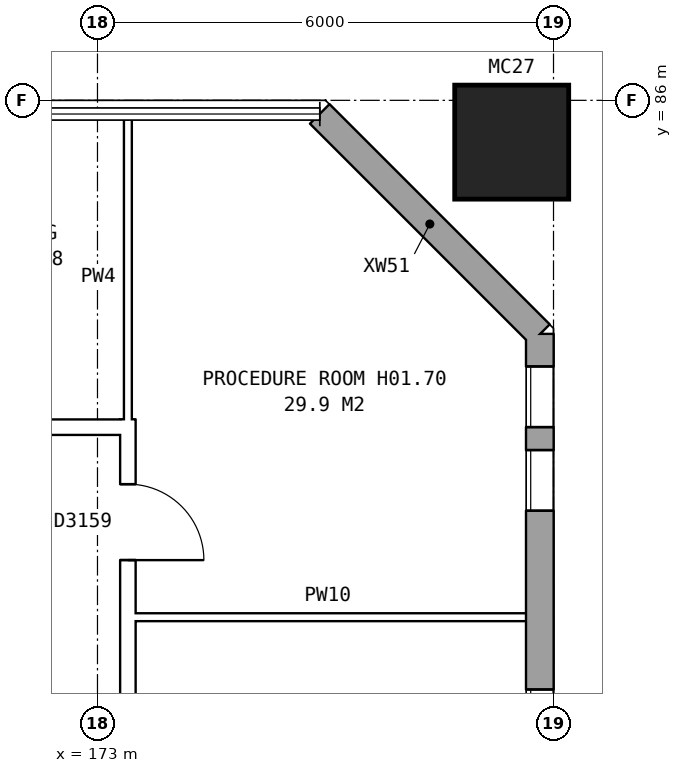
"""IFC4 building model, lengths in metres.
Left out: names, types, materials, properties, quantities, classifications, styles, units other than length and angle.
Written with IfcOpenShell. Run it as: python <this file> out.ifc"""

import sys

from ifc_helpers import new_model, si_unit, direction, frame, frame_2d, origin, origin_2d, place, context, subcontext, project, spatial, rectangle, hollow_rectangle, extrude, element, fill, save


model = new_model("IFC4")
c1 = context("Model", 3, precision=1e-05, world=origin(), true_north=direction((0.0, 1.0)))
c2 = subcontext(c1, "Body", "Model", "MODEL_VIEW")
j1 = project(units=[si_unit("LENGTHUNIT", "METRE"), si_unit("PLANEANGLEUNIT", "RADIAN")], contexts=[c1])
p1 = place(None, origin())
s1 = spatial("IfcSite", under=j1, at=p1, CompositionType="ELEMENT")
p2 = place(p1, origin())
s2 = spatial("IfcBuilding", under=s1, at=p2, CompositionType="ELEMENT")
p3 = place(p2, frame((0.0, 0.0, 5.5)))
s3 = spatial("IfcBuildingStorey", under=s2, at=p3, CompositionType="ELEMENT", Elevation=5.5)
p4 = place(p3, frame((178.45, 85.45, 0.0), z_axis=(0.0, 0.0, 1.0), x_axis=(1.0, 0.0, 0.0)))
e1 = element("IfcColumn", 1, at=p4, inside=s3, PredefinedType="COLUMN", context=c2, shape_type="SweptSolid", body=[
    extrude(hollow_rectangle(XDim=1.5, YDim=1.5, WallThickness=0.08, at=origin_2d()), origin(), (0.0, 0.0, 1.0), 4.6),
])
p5 = place(p3, frame((178.82, 57.075, 0.0), z_axis=(0.0, 0.0, 1.0), x_axis=(0.0, 1.0, 0.0)))
e2 = element("IfcWall", 2, at=p5, inside=s3, PredefinedType="STANDARD", context=c2, shape_type="SweptSolid", body=[
    extrude(rectangle(XDim=25.851, YDim=0.36, at=frame_2d((12.925, 0.0))), origin(), (0.0, 0.0, 1.0), 4.3),
])
p6 = place(p5, frame((0.3, 0.0, 1.4)))
e3 = element("IfcOpeningElement", 3, at=p6, cuts=e2, PredefinedType="OPENING", context=c2, shape_type="SweptSolid", body=[
    extrude(rectangle(XDim=0.8, YDim=1.2, at=frame_2d((0.4, 0.6))), frame((0.0, 0.19, 0.0), z_axis=(0.0, -1.0, 0.0), x_axis=(1.0, 0.0, 0.0)), (0.0, 0.0, 1.0), 0.38),
])
p7 = place(p5, frame((4.575, 0.0, 0.8)))
e4 = element("IfcOpeningElement", 4, at=p7, cuts=e2, PredefinedType="OPENING", context=c2, shape_type="SweptSolid", body=[
    extrude(rectangle(XDim=0.8, YDim=0.9, at=frame_2d((0.4, 0.45))), frame((0.0, 0.19, 0.0), z_axis=(0.0, -1.0, 0.0), x_axis=(1.0, 0.0, 0.0)), (0.0, 0.0, 1.0), 0.38),
])
p8 = place(p5, frame((7.625, 0.0, 0.8)))
e5 = element("IfcOpeningElement", 5, at=p8, cuts=e2, PredefinedType="OPENING", context=c2, shape_type="SweptSolid", body=[
    extrude(rectangle(XDim=1.6, YDim=1.8, at=frame_2d((0.8, 0.9))), frame((0.0, 0.19, 0.0), z_axis=(0.0, -1.0, 0.0), x_axis=(1.0, 0.0, 0.0)), (0.0, 0.0, 1.0), 0.38),
])
p9 = place(p5, frame((10.625, 0.0, 0.8)))
e6 = element("IfcOpeningElement", 6, at=p9, cuts=e2, PredefinedType="OPENING", context=c2, shape_type="SweptSolid", body=[
    extrude(rectangle(XDim=1.6, YDim=1.8, at=frame_2d((0.8, 0.9))), frame((0.0, 0.19, 0.0), z_axis=(0.0, -1.0, 0.0), x_axis=(1.0, 0.0, 0.0)), (0.0, 0.0, 1.0), 0.38),
])
p10 = place(p5, frame((13.625, 0.0, 0.8)))
e7 = element("IfcOpeningElement", 7, at=p10, cuts=e2, PredefinedType="OPENING", context=c2, shape_type="SweptSolid", body=[
    extrude(rectangle(XDim=1.6, YDim=1.8, at=frame_2d((0.8, 0.9))), frame((0.0, 0.19, 0.0), z_axis=(0.0, -1.0, 0.0), x_axis=(1.0, 0.0, 0.0)), (0.0, 0.0, 1.0), 0.38),
])
p11 = place(p5, frame((16.625, 0.0, 0.8)))
e8 = element("IfcOpeningElement", 8, at=p11, cuts=e2, PredefinedType="OPENING", context=c2, shape_type="SweptSolid", body=[
    extrude(rectangle(XDim=1.6, YDim=1.8, at=frame_2d((0.8, 0.9))), frame((0.0, 0.19, 0.0), z_axis=(0.0, -1.0, 0.0), x_axis=(1.0, 0.0, 0.0)), (0.0, 0.0, 1.0), 0.38),
])
p12 = place(p5, frame((19.075, 0.0, 0.8)))
e9 = element("IfcOpeningElement", 9, at=p12, cuts=e2, PredefinedType="OPENING", context=c2, shape_type="SweptSolid", body=[
    extrude(rectangle(XDim=1.0, YDim=1.2, at=frame_2d((0.5, 0.6))), frame((0.0, 0.19, 0.0), z_axis=(0.0, -1.0, 0.0), x_axis=(1.0, 0.0, 0.0)), (0.0, 0.0, 1.0), 0.38),
])
p13 = place(p5, frame((23.525, 0.0, 1.7)))
e10 = element("IfcOpeningElement", 10, at=p13, cuts=e2, PredefinedType="OPENING", context=c2, shape_type="SweptSolid", body=[
    extrude(rectangle(XDim=0.8, YDim=0.9, at=frame_2d((0.4, 0.45))), frame((0.0, 0.19, 0.0), z_axis=(0.0, -1.0, 0.0), x_axis=(1.0, 0.0, 0.0)), (0.0, 0.0, 1.0), 0.38),
])
p14 = place(p5, frame((1.4, 0.0, 1.7)))
e11 = element("IfcOpeningElement", 11, at=p14, cuts=e2, PredefinedType="OPENING", context=c2, shape_type="SweptSolid", body=[
    extrude(rectangle(XDim=0.8, YDim=0.9, at=frame_2d((0.4, 0.45))), frame((0.0, 0.19, 0.0), z_axis=(0.0, -1.0, 0.0), x_axis=(1.0, 0.0, 0.0)), (0.0, 0.0, 1.0), 0.38),
])
p15 = place(p5, frame((5.675, 0.0, 0.8)))
e12 = element("IfcOpeningElement", 12, at=p15, cuts=e2, PredefinedType="OPENING", context=c2, shape_type="SweptSolid", body=[
    extrude(rectangle(XDim=1.0, YDim=1.2, at=frame_2d((0.5, 0.6))), frame((0.0, 0.19, 0.0), z_axis=(0.0, -1.0, 0.0), x_axis=(1.0, 0.0, 0.0)), (0.0, 0.0, 1.0), 0.38),
])
p16 = place(p5, frame((20.375, 0.0, 0.8)))
e13 = element("IfcOpeningElement", 13, at=p16, cuts=e2, PredefinedType="OPENING", context=c2, shape_type="SweptSolid", body=[
    extrude(rectangle(XDim=0.8, YDim=0.9, at=frame_2d((0.4, 0.45))), frame((0.0, 0.19, 0.0), z_axis=(0.0, -1.0, 0.0), x_axis=(1.0, 0.0, 0.0)), (0.0, 0.0, 1.0), 0.38),
])
p17 = place(p5, frame((24.625, 0.0, 1.4)))
e14 = element("IfcOpeningElement", 14, at=p17, cuts=e2, PredefinedType="OPENING", context=c2, shape_type="SweptSolid", body=[
    extrude(rectangle(XDim=0.8, YDim=1.2, at=frame_2d((0.4, 0.6))), frame((0.0, 0.19, 0.0), z_axis=(0.0, -1.0, 0.0), x_axis=(1.0, 0.0, 0.0)), (0.0, 0.0, 1.0), 0.38),
])
p18 = place(p3, frame((178.82, 82.925, 0.0), z_axis=(0.0, 0.0, 1.0), x_axis=(-0.707106781187, 0.707106781187, 0.0)))
e15 = element("IfcWall", 15, at=p18, inside=s3, PredefinedType="STANDARD", context=c2, shape_type="SweptSolid", body=[
    extrude(rectangle(XDim=4.094, YDim=0.36, at=frame_2d((2.047, 0.0))), origin(), (0.0, 0.0, 1.0), 4.3),
])
p19 = place(p3, frame((173.3, 79.2, 0.0), z_axis=(0.0, 0.0, 1.0), x_axis=(1.0, 0.0, 0.0)))
e16 = element("IfcWall", 16, at=p19, inside=s3, PredefinedType="PARTITIONING", context=c2, shape_type="SweptSolid", body=[
    extrude(rectangle(XDim=5.46, YDim=0.1, at=frame_2d((2.73, 0.0))), origin(), (0.0, 0.0, 1.0), 4.3),
])
p20 = place(p3, frame((157.53, 81.7, 0.0), z_axis=(0.0, 0.0, 1.0), x_axis=(1.0, 0.0, 0.0)))
e17 = element("IfcWall", 17, at=p20, inside=s3, PredefinedType="PARTITIONING", context=c2, shape_type="SweptSolid", body=[
    extrude(rectangle(XDim=15.97, YDim=0.2, at=frame_2d((7.985, 0.0))), origin(), (0.0, 0.0, 1.0), 4.3),
])
p21 = place(p20, frame((2.795, 0.0, 0.0)))
e18 = element("IfcOpeningElement", 18, at=p21, cuts=e17, PredefinedType="OPENING", context=c2, shape_type="SweptSolid", body=[
    extrude(rectangle(XDim=1.0, YDim=2.1, at=frame_2d((0.5, 1.05))), frame((0.0, 0.11, 0.0), z_axis=(0.0, -1.0, 0.0), x_axis=(1.0, 0.0, 0.0)), (0.0, 0.0, 1.0), 0.22),
])
p22 = place(p20, frame((8.97, 0.0, 0.0)))
e19 = element("IfcOpeningElement", 19, at=p22, cuts=e17, PredefinedType="OPENING", context=c2, shape_type="SweptSolid", body=[
    extrude(rectangle(XDim=1.0, YDim=2.1, at=frame_2d((0.5, 1.05))), frame((0.0, 0.11, 0.0), z_axis=(0.0, -1.0, 0.0), x_axis=(1.0, 0.0, 0.0)), (0.0, 0.0, 1.0), 0.22),
])
p23 = place(p20, frame((13.67, 0.0, 0.0)))
e20 = element("IfcOpeningElement", 20, at=p23, cuts=e17, PredefinedType="OPENING", context=c2, shape_type="SweptSolid", body=[
    extrude(rectangle(XDim=1.0, YDim=2.1, at=frame_2d((0.5, 1.05))), frame((0.0, 0.11, 0.0), z_axis=(0.0, -1.0, 0.0), x_axis=(1.0, 0.0, 0.0)), (0.0, 0.0, 1.0), 0.22),
])
p24 = place(p3, frame((173.4, 58.198, 0.0), z_axis=(0.0, 0.0, 1.0), x_axis=(0.0, 1.0, 0.0)))
e21 = element("IfcWall", 21, at=p24, inside=s3, PredefinedType="PARTITIONING", context=c2, shape_type="SweptSolid", body=[
    extrude(rectangle(XDim=23.604, YDim=0.2, at=frame_2d((11.802, 0.0))), origin(), (0.0, 0.0, 1.0), 4.3),
])
p25 = place(p24, frame((0.851, 0.0, 0.0)))
e22 = element("IfcOpeningElement", 22, at=p25, cuts=e21, PredefinedType="OPENING", context=c2, shape_type="SweptSolid", body=[
    extrude(rectangle(XDim=1.0, YDim=2.1, at=frame_2d((0.5, 1.05))), frame((0.0, 0.11, 0.0), z_axis=(0.0, -1.0, 0.0), x_axis=(1.0, 0.0, 0.0)), (0.0, 0.0, 1.0), 0.22),
])
p26 = place(p24, frame((3.702, 0.0, 0.0)))
e23 = element("IfcOpeningElement", 23, at=p26, cuts=e21, PredefinedType="OPENING", context=c2, shape_type="SweptSolid", body=[
    extrude(rectangle(XDim=1.0, YDim=2.1, at=frame_2d((0.5, 1.05))), frame((0.0, 0.11, 0.0), z_axis=(0.0, -1.0, 0.0), x_axis=(1.0, 0.0, 0.0)), (0.0, 0.0, 1.0), 0.22),
])
p27 = place(p24, frame((6.802, 0.0, 0.0)))
e24 = element("IfcOpeningElement", 24, at=p27, cuts=e21, PredefinedType="OPENING", context=c2, shape_type="SweptSolid", body=[
    extrude(rectangle(XDim=1.0, YDim=2.1, at=frame_2d((0.5, 1.05))), frame((0.0, 0.11, 0.0), z_axis=(0.0, -1.0, 0.0), x_axis=(1.0, 0.0, 0.0)), (0.0, 0.0, 1.0), 0.22),
])
p28 = place(p24, frame((9.802, 0.0, 0.0)))
e25 = element("IfcOpeningElement", 25, at=p28, cuts=e21, PredefinedType="OPENING", context=c2, shape_type="SweptSolid", body=[
    extrude(rectangle(XDim=1.0, YDim=2.1, at=frame_2d((0.5, 1.05))), frame((0.0, 0.11, 0.0), z_axis=(0.0, -1.0, 0.0), x_axis=(1.0, 0.0, 0.0)), (0.0, 0.0, 1.0), 0.22),
])
p29 = place(p24, frame((12.802, 0.0, 0.0)))
e26 = element("IfcOpeningElement", 26, at=p29, cuts=e21, PredefinedType="OPENING", context=c2, shape_type="SweptSolid", body=[
    extrude(rectangle(XDim=1.0, YDim=2.1, at=frame_2d((0.5, 1.05))), frame((0.0, 0.11, 0.0), z_axis=(0.0, -1.0, 0.0), x_axis=(1.0, 0.0, 0.0)), (0.0, 0.0, 1.0), 0.22),
])
p30 = place(p24, frame((15.802, 0.0, 0.0)))
e27 = element("IfcOpeningElement", 27, at=p30, cuts=e21, PredefinedType="OPENING", context=c2, shape_type="SweptSolid", body=[
    extrude(rectangle(XDim=1.0, YDim=2.1, at=frame_2d((0.5, 1.05))), frame((0.0, 0.11, 0.0), z_axis=(0.0, -1.0, 0.0), x_axis=(1.0, 0.0, 0.0)), (0.0, 0.0, 1.0), 0.22),
])
p31 = place(p24, frame((18.902, 0.0, 0.0)))
e28 = element("IfcOpeningElement", 28, at=p31, cuts=e21, PredefinedType="OPENING", context=c2, shape_type="SweptSolid", body=[
    extrude(rectangle(XDim=1.0, YDim=2.1, at=frame_2d((0.5, 1.05))), frame((0.0, 0.11, 0.0), z_axis=(0.0, -1.0, 0.0), x_axis=(1.0, 0.0, 0.0)), (0.0, 0.0, 1.0), 0.22),
])
p32 = place(p24, frame((21.753, 0.0, 0.0)))
e29 = element("IfcOpeningElement", 29, at=p32, cuts=e21, PredefinedType="OPENING", context=c2, shape_type="SweptSolid", body=[
    extrude(rectangle(XDim=1.0, YDim=2.1, at=frame_2d((0.5, 1.05))), frame((0.0, 0.11, 0.0), z_axis=(0.0, -1.0, 0.0), x_axis=(1.0, 0.0, 0.0)), (0.0, 0.0, 1.0), 0.22),
])
p33 = place(p3, frame((173.4, 81.598, 0.0), z_axis=(0.0, 0.0, 1.0), x_axis=(0.0, 1.0, 0.0)))
e30 = element("IfcWall", 30, at=p33, inside=s3, PredefinedType="PARTITIONING", context=c2, shape_type="SweptSolid", body=[
    extrude(rectangle(XDim=4.162, YDim=0.1, at=frame_2d((2.081, 0.0))), origin(), (0.0, 0.0, 1.0), 4.3),
])
p34 = place(p13, origin())
e31 = element("IfcWindow", 31, at=p34, inside=s3, PartitioningType="SINGLE_PANEL", PredefinedType="WINDOW", context=c2, shape_type="SweptSolid", body=[
    extrude(rectangle(XDim=0.8, YDim=0.9, at=frame_2d((0.4, 0.45))), frame((0.0, 0.15, 0.0), z_axis=(0.0, -1.0, 0.0), x_axis=(1.0, 0.0, 0.0)), (0.0, 0.0, 1.0), 0.06),
])
fill(e10, e31)
p35 = place(p32, frame((1.0, 0.0, 0.0), z_axis=(0.0, 0.0, 1.0), x_axis=(-1.0, 0.0, 0.0)))
e32 = element("IfcDoor", 32, at=p35, inside=s3, OperationType="SINGLE_SWING_RIGHT", PredefinedType="DOOR", context=c2, shape_type="SweptSolid", body=[
    extrude(rectangle(XDim=1.0, YDim=2.1, at=frame_2d((0.5, 1.05))), frame((0.0, 0.025, 0.0), z_axis=(0.0, -1.0, 0.0), x_axis=(1.0, 0.0, 0.0)), (0.0, 0.0, 1.0), 0.05),
])
fill(e29, e32)
p36 = place(p16, origin())
e33 = element("IfcWindow", 33, at=p36, inside=s3, PartitioningType="SINGLE_PANEL", PredefinedType="WINDOW", context=c2, shape_type="SweptSolid", body=[
    extrude(rectangle(XDim=0.8, YDim=0.9, at=frame_2d((0.4, 0.45))), frame((0.0, 0.15, 0.0), z_axis=(0.0, -1.0, 0.0), x_axis=(1.0, 0.0, 0.0)), (0.0, 0.0, 1.0), 0.06),
])
fill(e13, e33)
p37 = place(p17, origin())
e34 = element("IfcWindow", 34, at=p37, inside=s3, PartitioningType="SINGLE_PANEL", PredefinedType="WINDOW", context=c2, shape_type="SweptSolid", body=[
    extrude(rectangle(XDim=0.8, YDim=1.2, at=frame_2d((0.4, 0.6))), frame((0.0, 0.15, 0.0), z_axis=(0.0, -1.0, 0.0), x_axis=(1.0, 0.0, 0.0)), (0.0, 0.0, 1.0), 0.06),
])
fill(e14, e34)
save(model, sys.argv[1])
